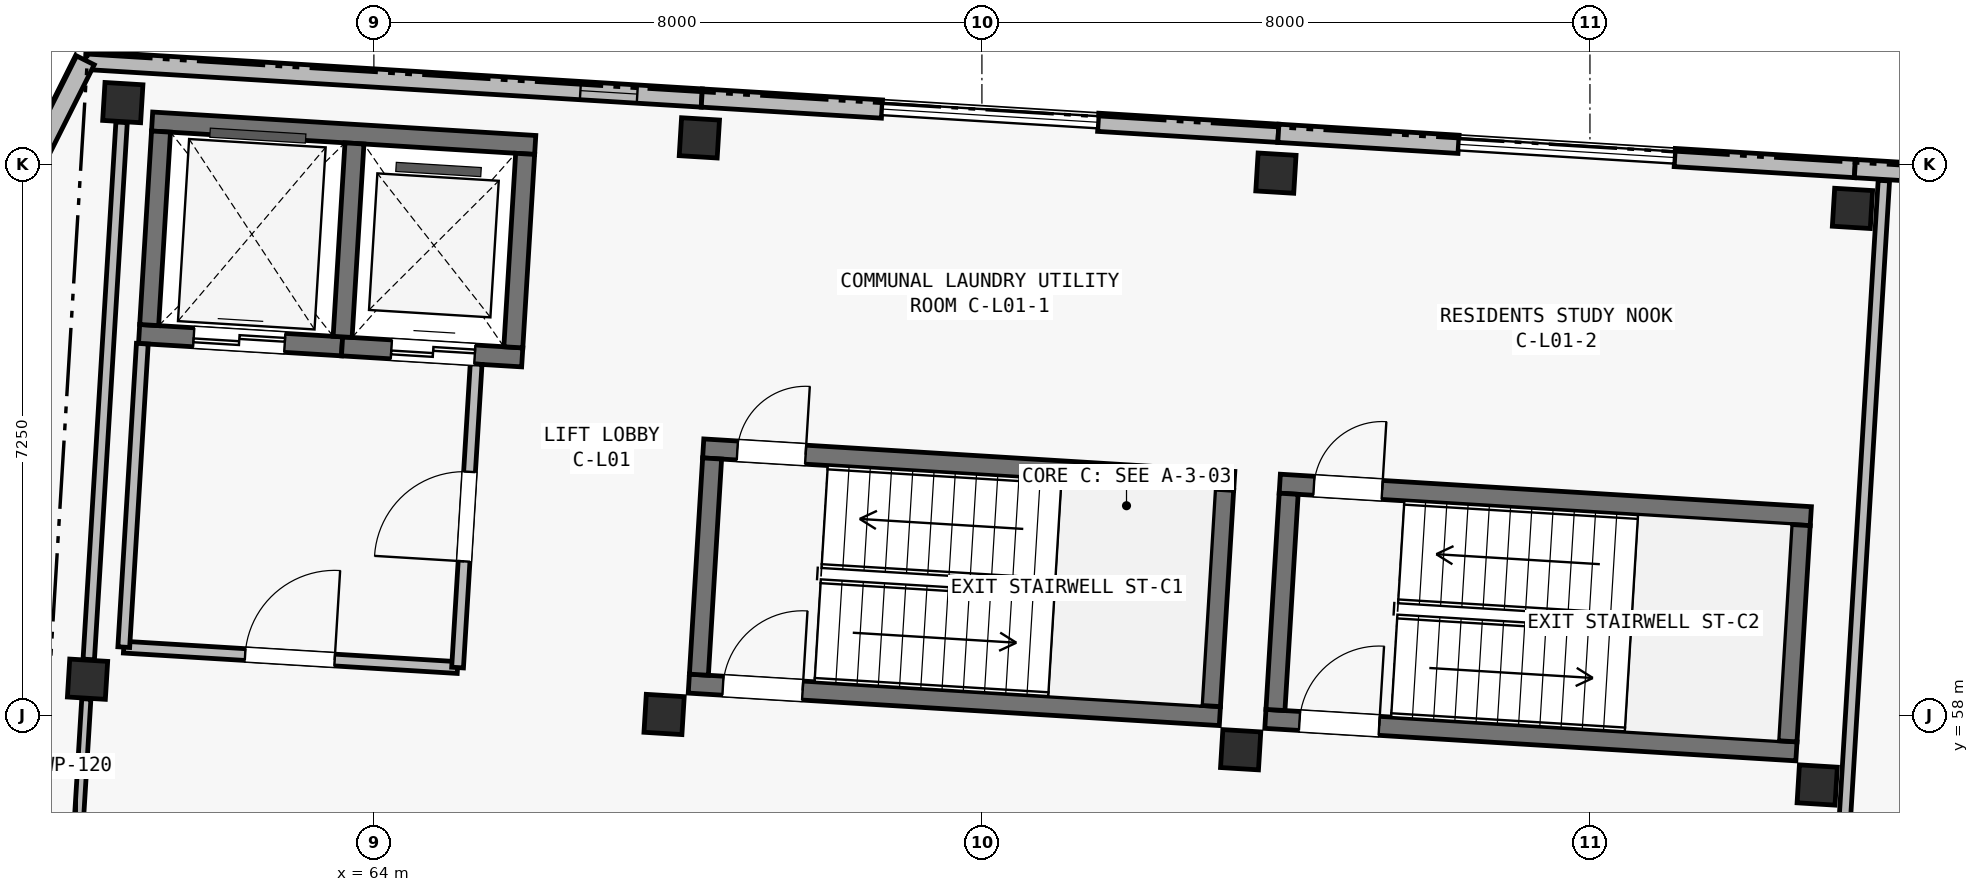
"""IFC4 building model, lengths in metres.
Left out: names, types, materials, properties, quantities, classifications, styles, units other than length and angle.
Written with IfcOpenShell. Run it as: python <this file> out.ifc"""

import sys

from ifc_helpers import new_model, si_unit, direction, frame, frame_2d, origin, origin_2d, place, context, subcontext, project, spatial, rectangle, extrude, element, fill, save


model = new_model("IFC4")
c1 = context("Model", 3, precision=1e-05, world=origin(), true_north=direction((0.0, 1.0)))
c2 = subcontext(c1, "Body", "Model", "MODEL_VIEW")
j1 = project(units=[si_unit("LENGTHUNIT", "METRE"), si_unit("PLANEANGLEUNIT", "RADIAN")], contexts=[c1])
p1 = place(None, origin())
s1 = spatial("IfcSite", under=j1, at=p1, CompositionType="ELEMENT")
p2 = place(p1, origin())
s2 = spatial("IfcBuilding", under=s1, at=p2, CompositionType="ELEMENT")
p3 = place(p2, frame((0.0, 0.0, 4.5)))
s3 = spatial("IfcBuildingStorey", under=s2, at=p3, CompositionType="ELEMENT", Elevation=4.5)
for number, where, z_axis, x_axis in (
    (1, (60.233, 58.478, 0.0), (0.0, 0.0, 1.0), (0.998, -0.061, 0.0)),
    (2, (60.697, 66.063, 0.0), (0.0, 0.0, 1.0), (0.998, -0.061, 0.0)),
    (3, (67.818, 58.014, 0.0), (0.0, 0.0, 1.0), (0.998, -0.061, 0.0)),
    (4, (68.282, 65.599, 0.0), (0.0, 0.0, 1.0), (0.998, -0.061, 0.0)),
    (5, (75.404, 57.55, 0.0), (0.0, 0.0, 1.0), (0.998, -0.061, 0.0)),
    (6, (75.868, 65.135, 0.0), (0.0, 0.0, 1.0), (0.998, -0.061, 0.0)),
    (7, (82.99, 57.086, 0.0), (0.0, 0.0, 1.0), (0.998, -0.061, 0.0)),
    (8, (83.454, 64.672, 0.0), (0.0, 0.0, 1.0), (0.998, -0.061, 0.0)),
):
    element("IfcColumn", number, at=place(p3, frame(where, z_axis=z_axis, x_axis=x_axis)), inside=s3, PredefinedType="COLUMN", context=c2, shape_type="SweptSolid", body=[
        extrude(rectangle(XDim=0.5, YDim=0.5, at=origin_2d()), origin(), (0.0, 0.0, 1.0), 3.9),
    ])
p4 = place(p3, frame((61.082, 65.814, 0.0), z_axis=(0.0, 0.0, 1.0), x_axis=(0.998134101522, -0.061059932685, 0.0)))
e9 = element("IfcWall", 9, at=p4, inside=s3, PredefinedType="SHEAR", context=c2, shape_type="SweptSolid", body=[
    extrude(rectangle(XDim=5.05, YDim=0.25, at=frame_2d((2.525, 0.0))), origin(), (0.0, 0.0, 1.0), 3.9),
])
p5 = place(p3, frame((60.911, 63.02, 0.0), z_axis=(0.0, 0.0, 1.0), x_axis=(0.998134099905, -0.061059959111, 0.0)))
e10 = element("IfcWall", 10, at=p5, inside=s3, PredefinedType="SHEAR", context=c2, shape_type="SweptSolid", body=[
    extrude(rectangle(XDim=2.675, YDim=0.25, at=frame_2d((1.337, 0.0))), origin(), (0.0, 0.0, 1.0), 3.9),
])
p6 = place(p5, frame((0.72, 0.0, 0.0)))
e11 = element("IfcOpeningElement", 11, at=p6, cuts=e10, PredefinedType="OPENING", context=c2, shape_type="SweptSolid", body=[
    extrude(rectangle(XDim=1.2, YDim=2.2, at=frame_2d((0.6, 1.1))), frame((0.0, 0.14, 0.0), z_axis=(0.0, -1.0, 0.0), x_axis=(1.0, 0.0, 0.0)), (0.0, 0.0, 1.0), 0.28),
])
p7 = place(p3, frame((63.581, 62.856, 0.0), z_axis=(0.0, 0.0, 1.0), x_axis=(0.998134103342, -0.061059902923, 0.0)))
e12 = element("IfcWall", 12, at=p7, inside=s3, PredefinedType="SHEAR", context=c2, shape_type="SweptSolid", body=[
    extrude(rectangle(XDim=2.375, YDim=0.25, at=frame_2d((1.188, 0.0))), origin(), (0.0, 0.0, 1.0), 3.9),
])
p8 = place(p7, frame((0.65, 0.0, 0.0)))
e13 = element("IfcOpeningElement", 13, at=p8, cuts=e12, PredefinedType="OPENING", context=c2, shape_type="SweptSolid", body=[
    extrude(rectangle(XDim=1.1, YDim=2.15, at=frame_2d((0.55, 1.075))), frame((0.0, 0.14, 0.0), z_axis=(0.0, -1.0, 0.0), x_axis=(1.0, 0.0, 0.0)), (0.0, 0.0, 1.0), 0.28),
])
p9 = place(p3, frame((61.043, 63.137, 0.0), z_axis=(0.0, 0.0, 1.0), x_axis=(0.061078919587, 0.998132939834, 0.0)))
e14 = element("IfcWall", 14, at=p9, inside=s3, PredefinedType="SHEAR", context=c2, shape_type="SweptSolid", body=[
    extrude(rectangle(XDim=2.55, YDim=0.25, at=frame_2d((1.275, 0.0))), origin(), (0.0, 0.0, 1.0), 3.9),
])
p10 = place(p3, frame((63.589, 62.981, 0.0), z_axis=(0.0, 0.0, 1.0), x_axis=(0.060989368901, 0.998138415692, 0.0)))
e15 = element("IfcWall", 15, at=p10, inside=s3, PredefinedType="SHEAR", context=c2, shape_type="SweptSolid", body=[
    extrude(rectangle(XDim=2.55, YDim=0.25, at=frame_2d((1.275, 0.0))), origin(), (0.0, 0.0, 1.0), 3.9),
])
p11 = place(p3, frame((65.834, 62.844, 0.0), z_axis=(0.0, 0.0, 1.0), x_axis=(0.061084756616, 0.998132582631, 0.0)))
e16 = element("IfcWall", 16, at=p11, inside=s3, PredefinedType="SHEAR", context=c2, shape_type="SweptSolid", body=[
    extrude(rectangle(XDim=2.55, YDim=0.25, at=frame_2d((1.275, 0.0))), origin(), (0.0, 0.0, 1.0), 3.9),
])
p12 = place(p3, frame((68.333, 61.514, 0.0), z_axis=(0.0, 0.0, 1.0), x_axis=(0.998135676081, -0.061034188237, 0.0)))
e17 = element("IfcWall", 17, at=p12, inside=s3, PredefinedType="SHEAR", context=c2, shape_type="SweptSolid", body=[
    extrude(rectangle(XDim=7.0, YDim=0.25, at=frame_2d((3.5, 0.0))), origin(), (0.0, 0.0, 1.0), 3.9),
])
p13 = place(p12, frame((0.45, 0.0, 0.0)))
e18 = element("IfcOpeningElement", 18, at=p13, cuts=e17, PredefinedType="OPENING", context=c2, shape_type="SweptSolid", body=[
    extrude(rectangle(XDim=0.9, YDim=2.1, at=frame_2d((0.45, 1.05))), frame((0.0, 0.14, 0.0), z_axis=(0.0, -1.0, 0.0), x_axis=(1.0, 0.0, 0.0)), (0.0, 0.0, 1.0), 0.28),
])
p14 = place(p3, frame((68.144, 58.419, 0.0), z_axis=(0.0, 0.0, 1.0), x_axis=(0.998135546153, -0.061036313012, 0.0)))
e19 = element("IfcWall", 19, at=p14, inside=s3, PredefinedType="SHEAR", context=c2, shape_type="SweptSolid", body=[
    extrude(rectangle(XDim=7.0, YDim=0.25, at=frame_2d((3.5, 0.0))), origin(), (0.0, 0.0, 1.0), 3.9),
])
p15 = place(p14, frame((0.45, 0.0, 0.0)))
e20 = element("IfcOpeningElement", 20, at=p15, cuts=e19, PredefinedType="OPENING", context=c2, shape_type="SweptSolid", body=[
    extrude(rectangle(XDim=1.05, YDim=2.15, at=frame_2d((0.525, 1.075))), frame((0.0, 0.14, 0.0), z_axis=(0.0, -1.0, 0.0), x_axis=(1.0, 0.0, 0.0)), (0.0, 0.0, 1.0), 0.28),
])
for number, where, z_axis, x_axis in (
    (21, (68.276, 58.537, 0.0), (0.0, 0.0, 1.0), (0.061, 0.998, 0.0)),
    (22, (75.014, 58.125, 0.0), (0.0, 0.0, 1.0), (0.061, 0.998, 0.0)),
):
    element("IfcWall", number, at=place(p3, frame(where, z_axis=z_axis, x_axis=x_axis)), inside=s3, PredefinedType="SHEAR", context=c2, shape_type="SweptSolid", body=[
        extrude(rectangle(XDim=2.85, YDim=0.25, at=frame_2d((1.425, 0.0))), origin(), (0.0, 0.0, 1.0), 3.9),
    ])
p16 = place(p3, frame((75.919, 61.05, 0.0), z_axis=(0.0, 0.0, 1.0), x_axis=(0.998135546153, -0.061036313012, 0.0)))
e23 = element("IfcWall", 23, at=p16, inside=s3, PredefinedType="SHEAR", context=c2, shape_type="SweptSolid", body=[
    extrude(rectangle(XDim=7.0, YDim=0.25, at=frame_2d((3.5, 0.0))), origin(), (0.0, 0.0, 1.0), 3.9),
])
p17 = place(p16, frame((0.45, 0.0, 0.0)))
e24 = element("IfcOpeningElement", 24, at=p17, cuts=e23, PredefinedType="OPENING", context=c2, shape_type="SweptSolid", body=[
    extrude(rectangle(XDim=0.9, YDim=2.1, at=frame_2d((0.45, 1.05))), frame((0.0, 0.14, 0.0), z_axis=(0.0, -1.0, 0.0), x_axis=(1.0, 0.0, 0.0)), (0.0, 0.0, 1.0), 0.28),
])
p18 = place(p3, frame((75.73, 57.956, 0.0), z_axis=(0.0, 0.0, 1.0), x_axis=(0.998135546153, -0.061036313012, 0.0)))
e25 = element("IfcWall", 25, at=p18, inside=s3, PredefinedType="SHEAR", context=c2, shape_type="SweptSolid", body=[
    extrude(rectangle(XDim=7.0, YDim=0.25, at=frame_2d((3.5, 0.0))), origin(), (0.0, 0.0, 1.0), 3.9),
])
p19 = place(p18, frame((0.45, 0.0, 0.0)))
e26 = element("IfcOpeningElement", 26, at=p19, cuts=e25, PredefinedType="OPENING", context=c2, shape_type="SweptSolid", body=[
    extrude(rectangle(XDim=1.05, YDim=2.15, at=frame_2d((0.525, 1.075))), frame((0.0, 0.14, 0.0), z_axis=(0.0, -1.0, 0.0), x_axis=(1.0, 0.0, 0.0)), (0.0, 0.0, 1.0), 0.28),
])
for number, where, z_axis, x_axis in (
    (27, (75.862, 58.073, 0.0), (0.0, 0.0, 1.0), (0.061, 0.998, 0.0)),
    (28, (82.599, 57.661, 0.0), (0.0, 0.0, 1.0), (0.061, 0.998, 0.0)),
):
    element("IfcWall", number, at=place(p3, frame(where, z_axis=z_axis, x_axis=x_axis)), inside=s3, PredefinedType="SHEAR", context=c2, shape_type="SweptSolid", body=[
        extrude(rectangle(XDim=2.85, YDim=0.25, at=frame_2d((1.425, 0.0))), origin(), (0.0, 0.0, 1.0), 3.9),
    ])
p20 = place(p3, frame((60.205, 66.62, 0.0), z_axis=(0.0, 0.0, 1.0), x_axis=(0.998134248939, -0.061057522844, 0.0)))
e29 = element("IfcWall", 29, at=p20, inside=s3, PredefinedType="SOLIDWALL", context=c2, shape_type="SweptSolid", body=[
    extrude(rectangle(XDim=8.125, YDim=0.24, at=frame_2d((4.062, 0.0))), origin(), (0.0, 0.0, 1.0), 3.65),
])
p21 = place(p20, frame((6.525, 0.0, 0.45)))
e30 = element("IfcOpeningElement", 30, at=p21, cuts=e29, PredefinedType="OPENING", context=c2, shape_type="SweptSolid", body=[
    extrude(rectangle(XDim=0.75, YDim=2.32, at=frame_2d((0.375, 1.16))), frame((0.0, 0.135, 0.0), z_axis=(0.0, -1.0, 0.0), x_axis=(1.0, 0.0, 0.0)), (0.0, 0.0, 1.0), 0.27),
])
p22 = place(p3, frame((68.314, 66.124, 0.0), z_axis=(0.0, 0.0, 1.0), x_axis=(0.998134103342, -0.061059902923, 0.0)))
e31 = element("IfcWall", 31, at=p22, inside=s3, PredefinedType="SOLIDWALL", context=c2, shape_type="SweptSolid", body=[
    extrude(rectangle(XDim=2.375, YDim=0.24, at=frame_2d((1.188, 0.0))), origin(), (0.0, 0.0, 1.0), 3.65),
])
p23 = place(p3, frame((73.53, 65.804, 0.0), z_axis=(0.0, 0.0, 1.0), x_axis=(0.998133720034, -0.061066168473, 0.0)))
e32 = element("IfcWall", 32, at=p23, inside=s3, PredefinedType="SOLIDWALL", context=c2, shape_type="SweptSolid", body=[
    extrude(rectangle(XDim=2.375, YDim=0.24, at=frame_2d((1.188, 0.0))), origin(), (0.0, 0.0, 1.0), 3.65),
])
for number, where, z_axis, x_axis in (
    (33, (75.9, 65.659, 0.0), (0.0, 0.0, 1.0), (0.998, -0.061, 0.0)),
    (34, (81.115, 65.341, 0.0), (0.0, 0.0, 1.0), (0.998, -0.061, 0.0)),
):
    element("IfcWall", number, at=place(p3, frame(where, z_axis=z_axis, x_axis=x_axis)), inside=s3, PredefinedType="SOLIDWALL", context=c2, shape_type="SweptSolid", body=[
        extrude(rectangle(XDim=2.375, YDim=0.24, at=frame_2d((1.188, 0.0))), origin(), (0.0, 0.0, 1.0), 3.65),
    ])
p24 = place(p3, frame((83.486, 65.196, 0.0), z_axis=(0.0, 0.0, 1.0), x_axis=(0.998135669243, -0.061034300063, 0.0)))
e35 = element("IfcWall", 35, at=p24, inside=s3, PredefinedType="SOLIDWALL", context=c2, shape_type="SweptSolid", body=[
    extrude(rectangle(XDim=7.6, YDim=0.24, at=frame_2d((3.8, 0.0))), origin(), (0.0, 0.0, 1.0), 3.65),
])
p25 = place(p24, frame((3.0, 0.0, 0.0)))
e36 = element("IfcOpeningElement", 36, at=p25, cuts=e35, PredefinedType="OPENING", context=c2, shape_type="SweptSolid", body=[
    extrude(rectangle(XDim=1.6, YDim=2.15, at=frame_2d((0.8, 1.075))), frame((0.0, 0.135, 0.0), z_axis=(0.0, -1.0, 0.0), x_axis=(1.0, 0.0, 0.0)), (0.0, 0.0, 1.0), 0.27),
])
p26 = place(p3, frame((51.654, 49.585, 0.0), z_axis=(0.0, 0.0, 1.0), x_axis=(0.448621989068, 0.893721607059, 0.0)))
e37 = element("IfcWall", 37, at=p26, inside=s3, PredefinedType="SOLIDWALL", context=c2, shape_type="SweptSolid", body=[
    extrude(rectangle(XDim=19.061, YDim=0.26, at=frame_2d((9.53, 0.0))), origin(), (0.0, 0.0, 1.0), 3.65),
])
p27 = place(p26, frame((2.63, 0.0, 0.52)))
e38 = element("IfcOpeningElement", 38, at=p27, cuts=e37, PredefinedType="OPENING", context=c2, shape_type="SweptSolid", body=[
    extrude(rectangle(XDim=0.58, YDim=2.16, at=frame_2d((0.29, 1.08))), frame((0.0, 0.145, 0.0), z_axis=(0.0, -1.0, 0.0), x_axis=(1.0, 0.0, 0.0)), (0.0, 0.0, 1.0), 0.29),
])
p28 = place(p26, frame((15.35, 0.0, 0.45)))
e39 = element("IfcOpeningElement", 39, at=p28, cuts=e37, PredefinedType="OPENING", context=c2, shape_type="SweptSolid", body=[
    extrude(rectangle(XDim=0.72, YDim=2.16, at=frame_2d((0.36, 1.08))), frame((0.0, 0.145, 0.0), z_axis=(0.0, -1.0, 0.0), x_axis=(1.0, 0.0, 0.0)), (0.0, 0.0, 1.0), 0.29),
])
p29 = place(p3, frame((60.709, 58.899, 0.0), z_axis=(0.0, 0.0, 1.0), x_axis=(0.998132276607, -0.061089756882, 0.0)))
e40 = element("IfcWall", 40, at=p29, inside=s3, PredefinedType="PARTITIONING", context=c2, shape_type="SweptSolid", body=[
    extrude(rectangle(XDim=4.4, YDim=0.155, at=frame_2d((2.2, 0.0))), origin(), (0.0, 0.0, 1.0), 3.62),
])
p30 = place(p29, frame((1.6, 0.0, 0.0)))
e41 = element("IfcOpeningElement", 41, at=p30, cuts=e40, PredefinedType="OPENING", context=c2, shape_type="SweptSolid", body=[
    extrude(rectangle(XDim=1.18, YDim=2.15, at=frame_2d((0.59, 1.075))), frame((0.0, 0.093, 0.0), z_axis=(0.0, -1.0, 0.0), x_axis=(1.0, 0.0, 0.0)), (0.0, 0.0, 1.0), 0.185),
])
p31 = place(p3, frame((60.709, 58.899, 0.0), z_axis=(0.0, 0.0, 1.0), x_axis=(0.061036844229, 0.998135513669, 0.0)))
e42 = element("IfcWall", 42, at=p31, inside=s3, PredefinedType="PARTITIONING", context=c2, shape_type="SweptSolid", body=[
    extrude(rectangle(XDim=4.0, YDim=0.155, at=frame_2d((2.0, 0.0))), origin(), (0.0, 0.0, 1.0), 3.62),
])
p32 = place(p3, frame((65.101, 58.631, 0.0), z_axis=(0.0, 0.0, 1.0), x_axis=(0.061033125904, 0.99813574104, 0.0)))
e43 = element("IfcWall", 43, at=p32, inside=s3, PredefinedType="PARTITIONING", context=c2, shape_type="SweptSolid", body=[
    extrude(rectangle(XDim=4.0, YDim=0.155, at=frame_2d((2.0, 0.0))), origin(), (0.0, 0.0, 1.0), 3.62),
])
p33 = place(p32, frame((1.4, 0.0, 0.0)))
e44 = element("IfcOpeningElement", 44, at=p33, cuts=e43, PredefinedType="OPENING", context=c2, shape_type="SweptSolid", body=[
    extrude(rectangle(XDim=1.18, YDim=2.15, at=frame_2d((0.59, 1.075))), frame((0.0, 0.093, 0.0), z_axis=(0.0, -1.0, 0.0), x_axis=(1.0, 0.0, 0.0)), (0.0, 0.0, 1.0), 0.185),
])
p34 = place(p3, frame((59.98, 54.345, 0.0), z_axis=(0.0, 0.0, 1.0), x_axis=(0.061101107425, 0.998131581843, 0.0)))
e45 = element("IfcWall", 45, at=p34, inside=s3, PredefinedType="PARTITIONING", context=c2, shape_type="SweptSolid", body=[
    extrude(rectangle(XDim=3.88, YDim=0.12, at=frame_2d((1.94, 0.0))), origin(), (0.0, 0.0, 1.0), 3.15),
])
p35 = place(p34, frame((1.35, 0.0, 0.0)))
e46 = element("IfcOpeningElement", 46, at=p35, cuts=e45, PredefinedType="OPENING", context=c2, shape_type="SweptSolid", body=[
    extrude(rectangle(XDim=0.88, YDim=2.1, at=frame_2d((0.44, 1.05))), frame((0.0, 0.075, 0.0), z_axis=(0.0, -1.0, 0.0), x_axis=(1.0, 0.0, 0.0)), (0.0, 0.0, 1.0), 0.15),
])
p36 = place(p3, frame((60.249, 58.737, 0.0), z_axis=(0.0, 0.0, 1.0), x_axis=(0.061034344288, 0.998135666539, 0.0)))
e47 = element("IfcWall", 47, at=p36, inside=s3, PredefinedType="PARTITIONING", context=c2, shape_type="SweptSolid", body=[
    extrude(rectangle(XDim=7.08, YDim=0.15, at=frame_2d((3.54, 0.0))), origin(), (0.0, 0.0, 1.0), 3.15),
])
p37 = place(p3, frame((83.265, 55.185, 0.0), z_axis=(0.0, 0.0, 1.0), x_axis=(0.061046193261, 0.998134941923, 0.0)))
e48 = element("IfcWall", 48, at=p37, inside=s3, PredefinedType="PARTITIONING", context=c2, shape_type="SweptSolid", body=[
    extrude(rectangle(XDim=9.87, YDim=0.15, at=frame_2d((4.935, 0.0))), origin(), (0.0, 0.0, 1.0), 3.62),
])
p38 = place(p21, origin())
e49 = element("IfcWindow", 49, at=p38, inside=s3, PartitioningType="SINGLE_PANEL", PredefinedType="WINDOW", context=c2, shape_type="SweptSolid", body=[
    extrude(rectangle(XDim=0.75, YDim=2.32, at=frame_2d((0.375, 1.16))), frame((0.0, 0.03, 0.0), z_axis=(0.0, -1.0, 0.0), x_axis=(1.0, 0.0, 0.0)), (0.0, 0.0, 1.0), 0.06),
])
fill(e30, e49)
p39 = place(p30, origin())
e50 = element("IfcDoor", 50, at=p39, inside=s3, OperationType="SINGLE_SWING_RIGHT", PredefinedType="DOOR", context=c2, shape_type="SweptSolid", body=[
    extrude(rectangle(XDim=1.18, YDim=2.15, at=frame_2d((0.59, 1.075))), frame((0.0, 0.025, 0.0), z_axis=(0.0, -1.0, 0.0), x_axis=(1.0, 0.0, 0.0)), (0.0, 0.0, 1.0), 0.05),
])
fill(e41, e50)
p40 = place(p33, origin())
e51 = element("IfcDoor", 51, at=p40, inside=s3, OperationType="SINGLE_SWING_LEFT", PredefinedType="DOOR", context=c2, shape_type="SweptSolid", body=[
    extrude(rectangle(XDim=1.18, YDim=2.15, at=frame_2d((0.59, 1.075))), frame((0.0, 0.025, 0.0), z_axis=(0.0, -1.0, 0.0), x_axis=(1.0, 0.0, 0.0)), (0.0, 0.0, 1.0), 0.05),
])
fill(e44, e51)
p41 = place(p15, origin())
e52 = element("IfcDoor", 52, at=p41, inside=s3, OperationType="SINGLE_SWING_RIGHT", PredefinedType="DOOR", context=c2, shape_type="SweptSolid", body=[
    extrude(rectangle(XDim=1.05, YDim=2.15, at=frame_2d((0.525, 1.075))), frame((0.0, 0.025, 0.0), z_axis=(0.0, -1.0, 0.0), x_axis=(1.0, 0.0, 0.0)), (0.0, 0.0, 1.0), 0.05),
])
fill(e20, e52)
p42 = place(p13, origin())
e53 = element("IfcDoor", 53, at=p42, inside=s3, OperationType="SINGLE_SWING_RIGHT", PredefinedType="DOOR", context=c2, shape_type="SweptSolid", body=[
    extrude(rectangle(XDim=0.9, YDim=2.1, at=frame_2d((0.45, 1.05))), frame((0.0, 0.025, 0.0), z_axis=(0.0, -1.0, 0.0), x_axis=(1.0, 0.0, 0.0)), (0.0, 0.0, 1.0), 0.05),
])
fill(e18, e53)
p43 = place(p19, origin())
e54 = element("IfcDoor", 54, at=p43, inside=s3, OperationType="SINGLE_SWING_RIGHT", PredefinedType="DOOR", context=c2, shape_type="SweptSolid", body=[
    extrude(rectangle(XDim=1.05, YDim=2.15, at=frame_2d((0.525, 1.075))), frame((0.0, 0.025, 0.0), z_axis=(0.0, -1.0, 0.0), x_axis=(1.0, 0.0, 0.0)), (0.0, 0.0, 1.0), 0.05),
])
fill(e26, e54)
p44 = place(p17, origin())
e55 = element("IfcDoor", 55, at=p44, inside=s3, OperationType="SINGLE_SWING_RIGHT", PredefinedType="DOOR", context=c2, shape_type="SweptSolid", body=[
    extrude(rectangle(XDim=0.9, YDim=2.1, at=frame_2d((0.45, 1.05))), frame((0.0, 0.025, 0.0), z_axis=(0.0, -1.0, 0.0), x_axis=(1.0, 0.0, 0.0)), (0.0, 0.0, 1.0), 0.05),
])
fill(e24, e55)
p45 = place(p6, origin())
e56 = element("IfcDoor", 56, at=p45, inside=s3, OperationType="DOUBLE_DOOR_SLIDING", PredefinedType="DOOR", context=c2, shape_type="SweptSolid", body=[
    extrude(rectangle(XDim=1.2, YDim=2.2, at=frame_2d((0.6, 1.1))), frame((0.0, 0.025, 0.0), z_axis=(0.0, -1.0, 0.0), x_axis=(1.0, 0.0, 0.0)), (0.0, 0.0, 1.0), 0.05),
])
fill(e11, e56)
p46 = place(p8, origin())
e57 = element("IfcDoor", 57, at=p46, inside=s3, OperationType="DOUBLE_DOOR_SLIDING", PredefinedType="DOOR", context=c2, shape_type="SweptSolid", body=[
    extrude(rectangle(XDim=1.1, YDim=2.15, at=frame_2d((0.55, 1.075))), frame((0.0, 0.025, 0.0), z_axis=(0.0, -1.0, 0.0), x_axis=(1.0, 0.0, 0.0)), (0.0, 0.0, 1.0), 0.05),
])
fill(e13, e57)
save(model, sys.argv[1])
